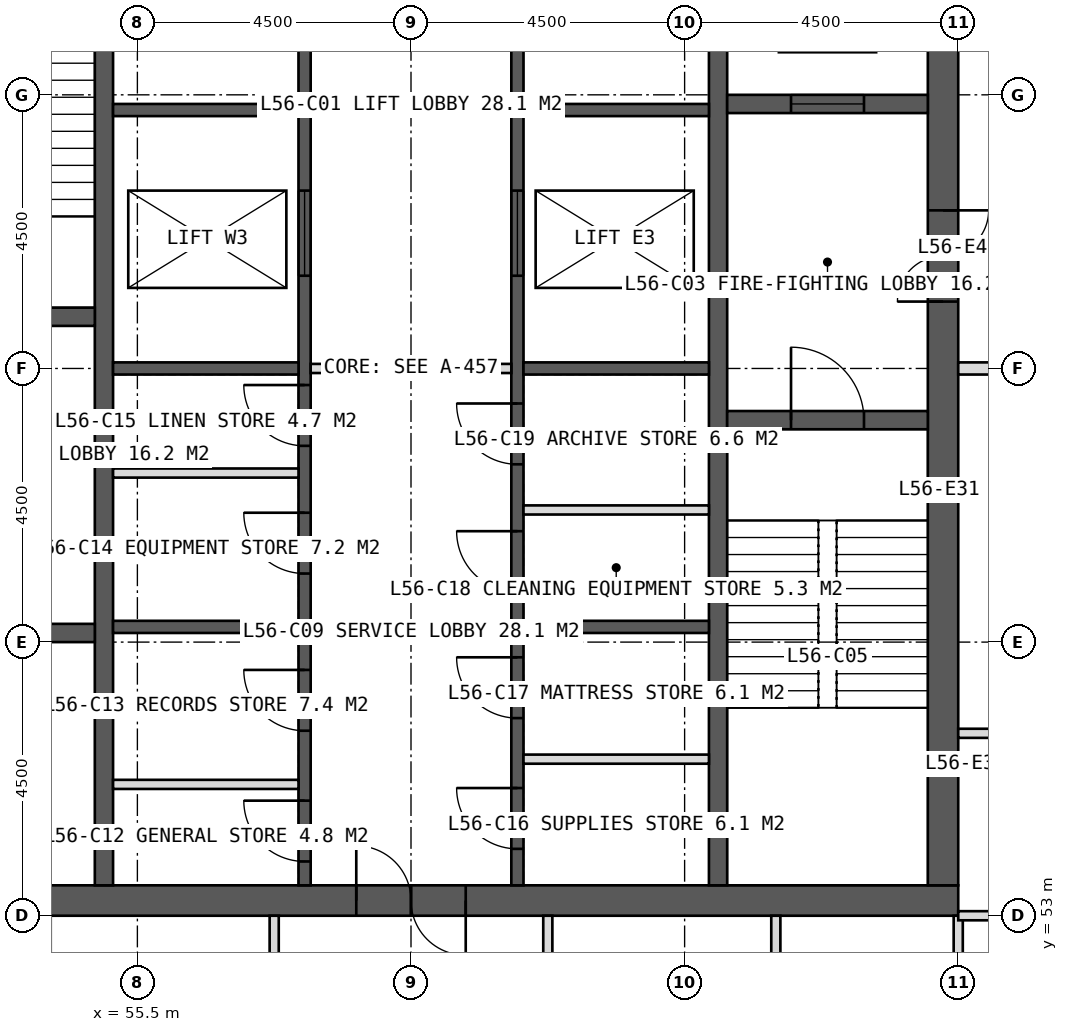
"""IFC4 building model, lengths in metres.
Left out: names, types, materials, properties, quantities, classifications, styles, units other than length and angle.
Written with IfcOpenShell. Run it as: python <this file> out.ifc"""

import sys

from ifc_helpers import new_model, si_unit, direction, frame, frame_2d, origin, place, context, subcontext, project, spatial, rectangle, extrude, element, fill, save


model = new_model("IFC4")
c1 = context("Model", 3, precision=1e-05, world=origin(), true_north=direction((0.0, 1.0)))
c2 = subcontext(c1, "Body", "Model", "MODEL_VIEW")
j1 = project(units=[si_unit("LENGTHUNIT", "METRE"), si_unit("PLANEANGLEUNIT", "RADIAN")], contexts=[c1])
p1 = place(None, origin())
s1 = spatial("IfcSite", under=j1, at=p1, CompositionType="ELEMENT")
p2 = place(p1, origin())
s2 = spatial("IfcBuilding", under=s1, at=p2, CompositionType="ELEMENT")
p3 = place(p2, frame((0.0, 0.0, 233.0)))
s3 = spatial("IfcBuildingStorey", under=s2, at=p3, CompositionType="ELEMENT", Elevation=233.0)
p4 = place(p3, frame((51.0, 53.25, 0.0), z_axis=(0.0, 0.0, 1.0), x_axis=(1.0, 0.0, 0.0)))
e1 = element("IfcWall", 1, at=p4, inside=s3, PredefinedType="SHEAR", context=c2, shape_type="SweptSolid", body=[
    extrude(rectangle(XDim=18.0, YDim=0.5, at=frame_2d((9.0, 0.0))), origin(), (0.0, 0.0, 1.0), 4.0),
])
p5 = place(p4, frame((8.1, 0.0, 0.0)))
e2 = element("IfcOpeningElement", 2, at=p5, cuts=e1, PredefinedType="OPENING", context=c2, shape_type="SweptSolid", body=[
    extrude(rectangle(XDim=1.8, YDim=2.2, at=frame_2d((0.9, 1.1))), frame((0.0, 0.26, 0.0), z_axis=(0.0, -1.0, 0.0), x_axis=(1.0, 0.0, 0.0)), (0.0, 0.0, 1.0), 0.52),
])
p6 = place(p3, frame((68.75, 53.5, 0.0), z_axis=(0.0, 0.0, 1.0), x_axis=(0.0, 1.0, 0.0)))
e3 = element("IfcWall", 3, at=p6, inside=s3, PredefinedType="SHEAR", context=c2, shape_type="SweptSolid", body=[
    extrude(rectangle(XDim=17.0, YDim=0.5, at=frame_2d((8.5, 0.0))), origin(), (0.0, 0.0, 1.0), 4.0),
])
p7 = place(p6, frame((9.6, 0.0, 0.0)))
e4 = element("IfcOpeningElement", 4, at=p7, cuts=e3, PredefinedType="OPENING", context=c2, shape_type="SweptSolid", body=[
    extrude(rectangle(XDim=1.5, YDim=2.2, at=frame_2d((0.75, 1.1))), frame((0.0, 0.26, 0.0), z_axis=(0.0, -1.0, 0.0), x_axis=(1.0, 0.0, 0.0)), (0.0, 0.0, 1.0), 0.52),
])
for number, where, z_axis, x_axis in (
    (5, (54.95, 53.5, 0.0), (0.0, 0.0, 1.0), (0.0, 1.0, 0.0)),
    (6, (65.05, 53.5, 0.0), (0.0, 0.0, 1.0), (0.0, 1.0, 0.0)),
):
    element("IfcWall", number, at=place(p3, frame(where, z_axis=z_axis, x_axis=x_axis)), inside=s3, PredefinedType="SHEAR", context=c2, shape_type="SweptSolid", body=[
        extrude(rectangle(XDim=17.0, YDim=0.3, at=frame_2d((8.5, 0.0))), origin(), (0.0, 0.0, 1.0), 4.0),
    ])
p8 = place(p3, frame((58.25, 53.5, 0.0), z_axis=(0.0, 0.0, 1.0), x_axis=(0.0, 1.0, 0.0)))
e7 = element("IfcWall", 7, at=p8, inside=s3, PredefinedType="SHEAR", context=c2, shape_type="SweptSolid", body=[
    extrude(rectangle(XDim=17.0, YDim=0.2, at=frame_2d((8.5, 0.0))), origin(), (0.0, 0.0, 1.0), 4.0),
])
p9 = place(p8, frame((0.393, 0.0, 0.0)))
e8 = element("IfcOpeningElement", 8, at=p9, cuts=e7, PredefinedType="OPENING", context=c2, shape_type="SweptSolid", body=[
    extrude(rectangle(XDim=1.0, YDim=2.1, at=frame_2d((0.5, 1.05))), frame((0.0, 0.11, 0.0), z_axis=(0.0, -1.0, 0.0), x_axis=(1.0, 0.0, 0.0)), (0.0, 0.0, 1.0), 0.22),
])
p10 = place(p8, frame((2.542, 0.0, 0.0)))
e9 = element("IfcOpeningElement", 9, at=p10, cuts=e7, PredefinedType="OPENING", context=c2, shape_type="SweptSolid", body=[
    extrude(rectangle(XDim=1.0, YDim=2.1, at=frame_2d((0.5, 1.05))), frame((0.0, 0.11, 0.0), z_axis=(0.0, -1.0, 0.0), x_axis=(1.0, 0.0, 0.0)), (0.0, 0.0, 1.0), 0.22),
])
p11 = place(p8, frame((5.127, 0.0, 0.0)))
e10 = element("IfcOpeningElement", 10, at=p11, cuts=e7, PredefinedType="OPENING", context=c2, shape_type="SweptSolid", body=[
    extrude(rectangle(XDim=1.0, YDim=2.1, at=frame_2d((0.5, 1.05))), frame((0.0, 0.11, 0.0), z_axis=(0.0, -1.0, 0.0), x_axis=(1.0, 0.0, 0.0)), (0.0, 0.0, 1.0), 0.22),
])
p12 = place(p8, frame((7.228, 0.0, 0.0)))
e11 = element("IfcOpeningElement", 11, at=p12, cuts=e7, PredefinedType="OPENING", context=c2, shape_type="SweptSolid", body=[
    extrude(rectangle(XDim=1.0, YDim=2.1, at=frame_2d((0.5, 1.05))), frame((0.0, 0.11, 0.0), z_axis=(0.0, -1.0, 0.0), x_axis=(1.0, 0.0, 0.0)), (0.0, 0.0, 1.0), 0.22),
])
p13 = place(p8, frame((10.025, 0.0, 0.0)))
e12 = element("IfcOpeningElement", 12, at=p13, cuts=e7, PredefinedType="OPENING", context=c2, shape_type="SweptSolid", body=[
    extrude(rectangle(XDim=1.4, YDim=2.2, at=frame_2d((0.7, 1.1))), frame((0.0, 0.11, 0.0), z_axis=(0.0, -1.0, 0.0), x_axis=(1.0, 0.0, 0.0)), (0.0, 0.0, 1.0), 0.22),
])
p14 = place(p8, frame((14.325, 0.0, 0.0)))
e13 = element("IfcOpeningElement", 13, at=p14, cuts=e7, PredefinedType="OPENING", context=c2, shape_type="SweptSolid", body=[
    extrude(rectangle(XDim=1.4, YDim=2.2, at=frame_2d((0.7, 1.1))), frame((0.0, 0.11, 0.0), z_axis=(0.0, -1.0, 0.0), x_axis=(1.0, 0.0, 0.0)), (0.0, 0.0, 1.0), 0.22),
])
p15 = place(p3, frame((61.75, 53.5, 0.0), z_axis=(0.0, 0.0, 1.0), x_axis=(0.0, 1.0, 0.0)))
e14 = element("IfcWall", 14, at=p15, inside=s3, PredefinedType="SHEAR", context=c2, shape_type="SweptSolid", body=[
    extrude(rectangle(XDim=17.0, YDim=0.2, at=frame_2d((8.5, 0.0))), origin(), (0.0, 0.0, 1.0), 4.0),
])
p16 = place(p15, frame((0.6, 0.0, 0.0)))
e15 = element("IfcOpeningElement", 15, at=p16, cuts=e14, PredefinedType="OPENING", context=c2, shape_type="SweptSolid", body=[
    extrude(rectangle(XDim=1.0, YDim=2.1, at=frame_2d((0.5, 1.05))), frame((0.0, 0.11, 0.0), z_axis=(0.0, -1.0, 0.0), x_axis=(1.0, 0.0, 0.0)), (0.0, 0.0, 1.0), 0.22),
])
p17 = place(p15, frame((2.75, 0.0, 0.0)))
e16 = element("IfcOpeningElement", 16, at=p17, cuts=e14, PredefinedType="OPENING", context=c2, shape_type="SweptSolid", body=[
    extrude(rectangle(XDim=1.0, YDim=2.1, at=frame_2d((0.5, 1.05))), frame((0.0, 0.11, 0.0), z_axis=(0.0, -1.0, 0.0), x_axis=(1.0, 0.0, 0.0)), (0.0, 0.0, 1.0), 0.22),
])
p18 = place(p15, frame((4.824, 0.0, 0.0)))
e17 = element("IfcOpeningElement", 17, at=p18, cuts=e14, PredefinedType="OPENING", context=c2, shape_type="SweptSolid", body=[
    extrude(rectangle(XDim=1.0, YDim=2.1, at=frame_2d((0.5, 1.05))), frame((0.0, 0.11, 0.0), z_axis=(0.0, -1.0, 0.0), x_axis=(1.0, 0.0, 0.0)), (0.0, 0.0, 1.0), 0.22),
])
p19 = place(p15, frame((6.924, 0.0, 0.0)))
e18 = element("IfcOpeningElement", 18, at=p19, cuts=e14, PredefinedType="OPENING", context=c2, shape_type="SweptSolid", body=[
    extrude(rectangle(XDim=1.0, YDim=2.1, at=frame_2d((0.5, 1.05))), frame((0.0, 0.11, 0.0), z_axis=(0.0, -1.0, 0.0), x_axis=(1.0, 0.0, 0.0)), (0.0, 0.0, 1.0), 0.22),
])
p20 = place(p15, frame((10.025, 0.0, 0.0)))
e19 = element("IfcOpeningElement", 19, at=p20, cuts=e14, PredefinedType="OPENING", context=c2, shape_type="SweptSolid", body=[
    extrude(rectangle(XDim=1.4, YDim=2.2, at=frame_2d((0.7, 1.1))), frame((0.0, 0.11, 0.0), z_axis=(0.0, -1.0, 0.0), x_axis=(1.0, 0.0, 0.0)), (0.0, 0.0, 1.0), 0.22),
])
p21 = place(p15, frame((14.325, 0.0, 0.0)))
e20 = element("IfcOpeningElement", 20, at=p21, cuts=e14, PredefinedType="OPENING", context=c2, shape_type="SweptSolid", body=[
    extrude(rectangle(XDim=1.4, YDim=2.2, at=frame_2d((0.7, 1.1))), frame((0.0, 0.11, 0.0), z_axis=(0.0, -1.0, 0.0), x_axis=(1.0, 0.0, 0.0)), (0.0, 0.0, 1.0), 0.22),
])
for number, where, z_axis, x_axis in (
    (21, (55.1, 57.75, 0.0), (0.0, 0.0, 1.0), (1.0, 0.0, 0.0)),
    (22, (61.85, 57.75, 0.0), (0.0, 0.0, 1.0), (1.0, 0.0, 0.0)),
    (23, (55.1, 62.0, 0.0), (0.0, 0.0, 1.0), (1.0, 0.0, 0.0)),
    (24, (61.85, 62.0, 0.0), (0.0, 0.0, 1.0), (1.0, 0.0, 0.0)),
    (25, (55.1, 66.25, 0.0), (0.0, 0.0, 1.0), (1.0, 0.0, 0.0)),
    (26, (61.85, 66.25, 0.0), (0.0, 0.0, 1.0), (1.0, 0.0, 0.0)),
):
    element("IfcWall", number, at=place(p3, frame(where, z_axis=z_axis, x_axis=x_axis)), inside=s3, PredefinedType="SHEAR", context=c2, shape_type="SweptSolid", body=[
        extrude(rectangle(XDim=3.05, YDim=0.2, at=frame_2d((1.525, 0.0))), origin(), (0.0, 0.0, 1.0), 4.0),
    ])
p22 = place(p3, frame((51.5, 62.85, 0.0), z_axis=(0.0, 0.0, 1.0), x_axis=(1.0, 0.0, 0.0)))
e27 = element("IfcWall", 27, at=p22, inside=s3, PredefinedType="SHEAR", context=c2, shape_type="SweptSolid", body=[
    extrude(rectangle(XDim=3.3, YDim=0.3, at=frame_2d((1.65, 0.0))), origin(), (0.0, 0.0, 1.0), 4.0),
])
p23 = place(p22, frame((1.15, 0.0, 0.0)))
e28 = element("IfcOpeningElement", 28, at=p23, cuts=e27, PredefinedType="OPENING", context=c2, shape_type="SweptSolid", body=[
    extrude(rectangle(XDim=1.2, YDim=2.1, at=frame_2d((0.6, 1.05))), frame((0.0, 0.16, 0.0), z_axis=(0.0, -1.0, 0.0), x_axis=(1.0, 0.0, 0.0)), (0.0, 0.0, 1.0), 0.32),
])
p24 = place(p3, frame((51.5, 57.65, 0.0), z_axis=(0.0, 0.0, 1.0), x_axis=(1.0, 0.0, 0.0)))
e29 = element("IfcWall", 29, at=p24, inside=s3, PredefinedType="SHEAR", context=c2, shape_type="SweptSolid", body=[
    extrude(rectangle(XDim=3.3, YDim=0.3, at=frame_2d((1.65, 0.0))), origin(), (0.0, 0.0, 1.0), 4.0),
])
p25 = place(p24, frame((1.15, 0.0, 0.0)))
e30 = element("IfcOpeningElement", 30, at=p25, cuts=e29, PredefinedType="OPENING", context=c2, shape_type="SweptSolid", body=[
    extrude(rectangle(XDim=1.2, YDim=2.2, at=frame_2d((0.6, 1.1))), frame((0.0, 0.16, 0.0), z_axis=(0.0, -1.0, 0.0), x_axis=(1.0, 0.0, 0.0)), (0.0, 0.0, 1.0), 0.32),
])
p26 = place(p3, frame((65.2, 61.15, 0.0), z_axis=(0.0, 0.0, 1.0), x_axis=(1.0, 0.0, 0.0)))
e31 = element("IfcWall", 31, at=p26, inside=s3, PredefinedType="SHEAR", context=c2, shape_type="SweptSolid", body=[
    extrude(rectangle(XDim=3.3, YDim=0.3, at=frame_2d((1.65, 0.0))), origin(), (0.0, 0.0, 1.0), 4.0),
])
p27 = place(p26, frame((1.05, 0.0, 0.0)))
e32 = element("IfcOpeningElement", 32, at=p27, cuts=e31, PredefinedType="OPENING", context=c2, shape_type="SweptSolid", body=[
    extrude(rectangle(XDim=1.2, YDim=2.1, at=frame_2d((0.6, 1.05))), frame((0.0, 0.16, 0.0), z_axis=(0.0, -1.0, 0.0), x_axis=(1.0, 0.0, 0.0)), (0.0, 0.0, 1.0), 0.32),
])
p28 = place(p3, frame((65.2, 66.35, 0.0), z_axis=(0.0, 0.0, 1.0), x_axis=(1.0, 0.0, 0.0)))
e33 = element("IfcWall", 33, at=p28, inside=s3, PredefinedType="SHEAR", context=c2, shape_type="SweptSolid", body=[
    extrude(rectangle(XDim=3.3, YDim=0.3, at=frame_2d((1.65, 0.0))), origin(), (0.0, 0.0, 1.0), 4.0),
])
p29 = place(p28, frame((1.05, 0.0, 0.0)))
e34 = element("IfcOpeningElement", 34, at=p29, cuts=e33, PredefinedType="OPENING", context=c2, shape_type="SweptSolid", body=[
    extrude(rectangle(XDim=1.2, YDim=2.2, at=frame_2d((0.6, 1.1))), frame((0.0, 0.16, 0.0), z_axis=(0.0, -1.0, 0.0), x_axis=(1.0, 0.0, 0.0)), (0.0, 0.0, 1.0), 0.32),
])
p30 = place(p3, frame((69.0, 53.0, 0.0), z_axis=(0.0, 0.0, 1.0), x_axis=(0.0, -1.0, 0.0)))
e35 = element("IfcWall", 35, at=p30, inside=s3, PredefinedType="PARTITIONING", context=c2, shape_type="SweptSolid", body=[
    extrude(rectangle(XDim=5.4, YDim=0.15, at=frame_2d((2.7, 0.0))), origin(), (0.0, 0.0, 1.0), 3.75),
])
for number, where, z_axis, x_axis in (
    (36, (62.25, 53.0, 0.0), (0.0, 0.0, 1.0), (0.0, -1.0, 0.0)),
    (37, (57.75, 53.0, 0.0), (0.0, 0.0, 1.0), (0.0, -1.0, 0.0)),
    (38, (66.0, 53.0, 0.0), (0.0, 0.0, 1.0), (0.0, -1.0, 0.0)),
):
    element("IfcWall", number, at=place(p3, frame(where, z_axis=z_axis, x_axis=x_axis)), inside=s3, PredefinedType="PARTITIONING", context=c2, shape_type="SweptSolid", body=[
        extrude(rectangle(XDim=3.9, YDim=0.15, at=frame_2d((1.95, 0.0))), origin(), (0.0, 0.0, 1.0), 3.75),
    ])
p31 = place(p3, frame((69.0, 62.0, 0.0), z_axis=(0.0, 0.0, 1.0), x_axis=(1.0, 0.0, 0.0)))
e39 = element("IfcWall", 39, at=p31, inside=s3, PredefinedType="SOLIDWALL", context=c2, shape_type="SweptSolid", body=[
    extrude(rectangle(XDim=5.4, YDim=0.2, at=frame_2d((2.7, 0.0))), origin(), (0.0, 0.0, 1.0), 2.95),
])
for number, where, z_axis, x_axis in (
    (40, (69.0, 56.0, 0.0), (0.0, 0.0, 1.0), (1.0, 0.0, 0.0)),
    (41, (69.0, 53.0, 0.0), (0.0, 0.0, 1.0), (1.0, 0.0, 0.0)),
):
    element("IfcWall", number, at=place(p3, frame(where, z_axis=z_axis, x_axis=x_axis)), inside=s3, PredefinedType="PARTITIONING", context=c2, shape_type="SweptSolid", body=[
        extrude(rectangle(XDim=5.4, YDim=0.15, at=frame_2d((2.7, 0.0))), origin(), (0.0, 0.0, 1.0), 3.75),
    ])
for number, where, z_axis, x_axis in (
    (42, (55.1, 55.16, 0.0), (0.0, 0.0, 1.0), (1.0, 0.0, 0.0)),
    (43, (61.85, 55.575, 0.0), (0.0, 0.0, 1.0), (1.0, 0.0, 0.0)),
    (44, (55.1, 60.28, 0.0), (0.0, 0.0, 1.0), (1.0, 0.0, 0.0)),
    (45, (61.85, 59.673, 0.0), (0.0, 0.0, 1.0), (1.0, 0.0, 0.0)),
):
    element("IfcWall", number, at=place(p3, frame(where, z_axis=z_axis, x_axis=x_axis)), inside=s3, PredefinedType="PARTITIONING", context=c2, shape_type="SweptSolid", body=[
        extrude(rectangle(XDim=3.05, YDim=0.15, at=frame_2d((1.525, 0.0))), origin(), (0.0, 0.0, 1.0), 3.75),
    ])
p32 = place(p3, frame((58.35, 62.0, 0.0), z_axis=(0.0, 0.0, 1.0), x_axis=(1.0, 0.0, 0.0)))
e46 = element("IfcWall", 46, at=p32, inside=s3, PredefinedType="PARTITIONING", context=c2, shape_type="SweptSolid", body=[
    extrude(rectangle(XDim=3.3, YDim=0.15, at=frame_2d((1.65, 0.0))), origin(), (0.0, 0.0, 1.0), 3.75),
])
p33 = place(p7, origin())
e47 = element("IfcDoor", 47, at=p33, inside=s3, OperationType="DOUBLE_DOOR_SINGLE_SWING", PredefinedType="DOOR", context=c2, shape_type="SweptSolid", body=[
    extrude(rectangle(XDim=1.5, YDim=2.2, at=frame_2d((0.75, 1.1))), frame((0.0, 0.025, 0.0), z_axis=(0.0, -1.0, 0.0), x_axis=(1.0, 0.0, 0.0)), (0.0, 0.0, 1.0), 0.05),
])
fill(e4, e47)
p34 = place(p27, origin())
e48 = element("IfcDoor", 48, at=p34, inside=s3, OperationType="SINGLE_SWING_LEFT", PredefinedType="DOOR", context=c2, shape_type="SweptSolid", body=[
    extrude(rectangle(XDim=1.2, YDim=2.1, at=frame_2d((0.6, 1.05))), frame((0.0, 0.025, 0.0), z_axis=(0.0, -1.0, 0.0), x_axis=(1.0, 0.0, 0.0)), (0.0, 0.0, 1.0), 0.05),
])
fill(e32, e48)
p35 = place(p29, origin())
e49 = element("IfcDoor", 49, at=p35, inside=s3, OperationType="SLIDING_TO_LEFT", PredefinedType="DOOR", context=c2, shape_type="SweptSolid", body=[
    extrude(rectangle(XDim=1.2, YDim=2.2, at=frame_2d((0.6, 1.1))), frame((0.0, 0.025, 0.0), z_axis=(0.0, -1.0, 0.0), x_axis=(1.0, 0.0, 0.0)), (0.0, 0.0, 1.0), 0.05),
])
fill(e34, e49)
p36 = place(p9, origin())
e50 = element("IfcDoor", 50, at=p36, inside=s3, OperationType="SINGLE_SWING_RIGHT", PredefinedType="DOOR", context=c2, shape_type="SweptSolid", body=[
    extrude(rectangle(XDim=1.0, YDim=2.1, at=frame_2d((0.5, 1.05))), frame((0.0, 0.025, 0.0), z_axis=(0.0, -1.0, 0.0), x_axis=(1.0, 0.0, 0.0)), (0.0, 0.0, 1.0), 0.05),
])
fill(e8, e50)
p37 = place(p10, origin())
e51 = element("IfcDoor", 51, at=p37, inside=s3, OperationType="SINGLE_SWING_RIGHT", PredefinedType="DOOR", context=c2, shape_type="SweptSolid", body=[
    extrude(rectangle(XDim=1.0, YDim=2.1, at=frame_2d((0.5, 1.05))), frame((0.0, 0.025, 0.0), z_axis=(0.0, -1.0, 0.0), x_axis=(1.0, 0.0, 0.0)), (0.0, 0.0, 1.0), 0.05),
])
fill(e9, e51)
p38 = place(p16, origin())
e52 = element("IfcDoor", 52, at=p38, inside=s3, OperationType="SINGLE_SWING_RIGHT", PredefinedType="DOOR", context=c2, shape_type="SweptSolid", body=[
    extrude(rectangle(XDim=1.0, YDim=2.1, at=frame_2d((0.5, 1.05))), frame((0.0, 0.025, 0.0), z_axis=(0.0, -1.0, 0.0), x_axis=(1.0, 0.0, 0.0)), (0.0, 0.0, 1.0), 0.05),
])
fill(e15, e52)
p39 = place(p17, origin())
e53 = element("IfcDoor", 53, at=p39, inside=s3, OperationType="SINGLE_SWING_RIGHT", PredefinedType="DOOR", context=c2, shape_type="SweptSolid", body=[
    extrude(rectangle(XDim=1.0, YDim=2.1, at=frame_2d((0.5, 1.05))), frame((0.0, 0.025, 0.0), z_axis=(0.0, -1.0, 0.0), x_axis=(1.0, 0.0, 0.0)), (0.0, 0.0, 1.0), 0.05),
])
fill(e16, e53)
p40 = place(p11, origin())
e54 = element("IfcDoor", 54, at=p40, inside=s3, OperationType="SINGLE_SWING_RIGHT", PredefinedType="DOOR", context=c2, shape_type="SweptSolid", body=[
    extrude(rectangle(XDim=1.0, YDim=2.1, at=frame_2d((0.5, 1.05))), frame((0.0, 0.025, 0.0), z_axis=(0.0, -1.0, 0.0), x_axis=(1.0, 0.0, 0.0)), (0.0, 0.0, 1.0), 0.05),
])
fill(e10, e54)
p41 = place(p12, origin())
e55 = element("IfcDoor", 55, at=p41, inside=s3, OperationType="SINGLE_SWING_RIGHT", PredefinedType="DOOR", context=c2, shape_type="SweptSolid", body=[
    extrude(rectangle(XDim=1.0, YDim=2.1, at=frame_2d((0.5, 1.05))), frame((0.0, 0.025, 0.0), z_axis=(0.0, -1.0, 0.0), x_axis=(1.0, 0.0, 0.0)), (0.0, 0.0, 1.0), 0.05),
])
fill(e11, e55)
p42 = place(p18, origin())
e56 = element("IfcDoor", 56, at=p42, inside=s3, OperationType="SINGLE_SWING_RIGHT", PredefinedType="DOOR", context=c2, shape_type="SweptSolid", body=[
    extrude(rectangle(XDim=1.0, YDim=2.1, at=frame_2d((0.5, 1.05))), frame((0.0, 0.025, 0.0), z_axis=(0.0, -1.0, 0.0), x_axis=(1.0, 0.0, 0.0)), (0.0, 0.0, 1.0), 0.05),
])
fill(e17, e56)
p43 = place(p19, origin())
e57 = element("IfcDoor", 57, at=p43, inside=s3, OperationType="SINGLE_SWING_RIGHT", PredefinedType="DOOR", context=c2, shape_type="SweptSolid", body=[
    extrude(rectangle(XDim=1.0, YDim=2.1, at=frame_2d((0.5, 1.05))), frame((0.0, 0.025, 0.0), z_axis=(0.0, -1.0, 0.0), x_axis=(1.0, 0.0, 0.0)), (0.0, 0.0, 1.0), 0.05),
])
fill(e18, e57)
p44 = place(p13, origin())
e58 = element("IfcDoor", 58, at=p44, inside=s3, OperationType="SLIDING_TO_LEFT", PredefinedType="DOOR", context=c2, shape_type="SweptSolid", body=[
    extrude(rectangle(XDim=1.4, YDim=2.2, at=frame_2d((0.7, 1.1))), frame((0.0, 0.025, 0.0), z_axis=(0.0, -1.0, 0.0), x_axis=(1.0, 0.0, 0.0)), (0.0, 0.0, 1.0), 0.05),
])
fill(e12, e58)
p45 = place(p20, origin())
e59 = element("IfcDoor", 59, at=p45, inside=s3, OperationType="SLIDING_TO_LEFT", PredefinedType="DOOR", context=c2, shape_type="SweptSolid", body=[
    extrude(rectangle(XDim=1.4, YDim=2.2, at=frame_2d((0.7, 1.1))), frame((0.0, 0.025, 0.0), z_axis=(0.0, -1.0, 0.0), x_axis=(1.0, 0.0, 0.0)), (0.0, 0.0, 1.0), 0.05),
])
fill(e19, e59)
p46 = place(p5, origin())
e60 = element("IfcDoor", 60, at=p46, inside=s3, OperationType="DOUBLE_DOOR_SINGLE_SWING", PredefinedType="DOOR", context=c2, shape_type="SweptSolid", body=[
    extrude(rectangle(XDim=1.8, YDim=2.2, at=frame_2d((0.9, 1.1))), frame((0.0, 0.025, 0.0), z_axis=(0.0, -1.0, 0.0), x_axis=(1.0, 0.0, 0.0)), (0.0, 0.0, 1.0), 0.05),
])
fill(e2, e60)
save(model, sys.argv[1])
